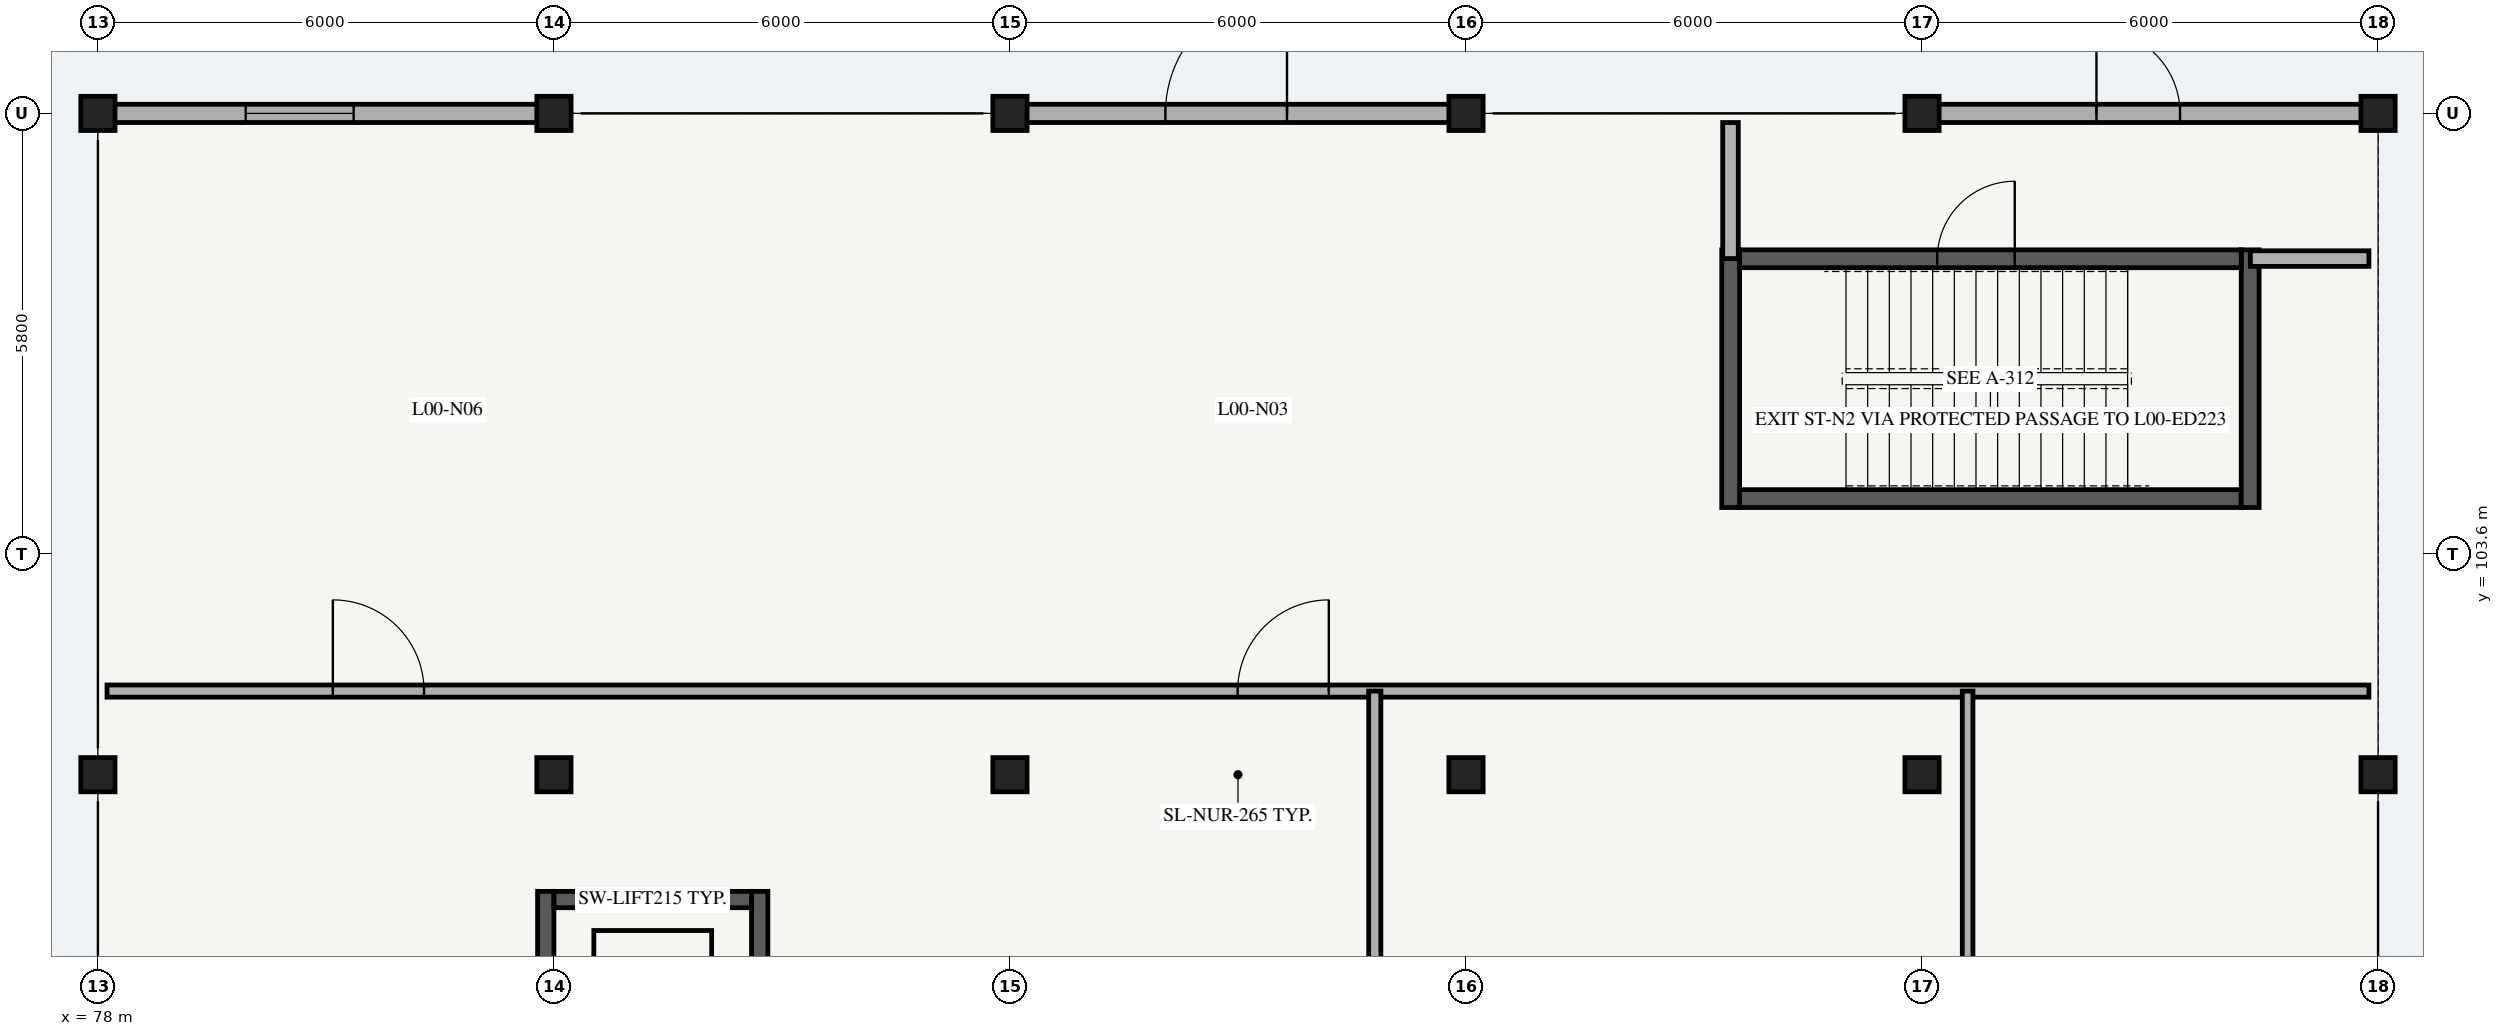
"""IFC4 building model, lengths in metres.
Left out: names, types, materials, properties, quantities, classifications, styles, units other than length and angle.
Written with IfcOpenShell. Run it as: python <this file> out.ifc"""

import sys

from ifc_helpers import new_model, si_unit, direction, frame, frame_2d, origin, origin_2d, place, context, subcontext, project, spatial, rectangle, extrude, element, fill, save


model = new_model("IFC4")
c1 = context("Model", 3, precision=1e-05, world=origin(), true_north=direction((0.0, 1.0)))
c2 = subcontext(c1, "Body", "Model", "MODEL_VIEW")
j1 = project(units=[si_unit("LENGTHUNIT", "METRE"), si_unit("PLANEANGLEUNIT", "RADIAN")], contexts=[c1])
p1 = place(None, origin())
s1 = spatial("IfcSite", under=j1, at=p1, CompositionType="ELEMENT")
p2 = place(p1, origin())
s2 = spatial("IfcBuilding", under=s1, at=p2, CompositionType="ELEMENT")
p3 = place(p2, origin())
s3 = spatial("IfcBuildingStorey", under=s2, at=p3, CompositionType="ELEMENT", Elevation=0.0)
p4 = place(p3, frame((83.893, 96.135, 0.0), z_axis=(0.0, 0.0, 1.0), x_axis=(0.0, 1.0, 0.0)))
e1 = element("IfcWall", 1, at=p4, inside=s3, PredefinedType="SHEAR", context=c2, shape_type="SweptSolid", body=[
    extrude(rectangle(XDim=3.03, YDim=0.215, at=frame_2d((1.515, 0.0))), origin(), (0.0, 0.0, 1.0), 4.495),
])
p5 = place(p4, frame((0.9, 0.0, 0.0)))
e2 = element("IfcOpeningElement", 2, at=p5, cuts=e1, PredefinedType="OPENING", context=c2, shape_type="SweptSolid", body=[
    extrude(rectangle(XDim=0.95, YDim=2.15, at=frame_2d((0.475, 1.075))), frame((0.0, 0.117, 0.0), z_axis=(0.0, -1.0, 0.0), x_axis=(1.0, 0.0, 0.0)), (0.0, 0.0, 1.0), 0.235),
])
p6 = place(p3, frame((86.708, 96.135, 0.0), z_axis=(0.0, 0.0, 1.0), x_axis=(0.0, 1.0, 0.0)))
e3 = element("IfcWall", 3, at=p6, inside=s3, PredefinedType="SHEAR", context=c2, shape_type="SweptSolid", body=[
    extrude(rectangle(XDim=3.03, YDim=0.215, at=frame_2d((1.515, 0.0))), origin(), (0.0, 0.0, 1.0), 4.495),
])
p7 = place(p3, frame((84.0, 99.058, 0.0), z_axis=(0.0, 0.0, 1.0), x_axis=(1.0, 0.0, 0.0)))
e4 = element("IfcWall", 4, at=p7, inside=s3, PredefinedType="SHEAR", context=c2, shape_type="SweptSolid", body=[
    extrude(rectangle(XDim=2.6, YDim=0.215, at=frame_2d((1.3, 0.0))), origin(), (0.0, 0.0, 1.0), 4.495),
])
p8 = place(p3, frame((99.6, 104.333, 0.0), z_axis=(0.0, 0.0, 1.0), x_axis=(1.0, 0.0, 0.0)))
e5 = element("IfcWall", 5, at=p8, inside=s3, PredefinedType="SHEAR", context=c2, shape_type="SweptSolid", body=[
    extrude(rectangle(XDim=6.6, YDim=0.235, at=frame_2d((3.3, 0.0))), origin(), (0.0, 0.0, 1.0), 4.495),
])
for number, where, z_axis, x_axis in (
    (6, (106.317, 104.215, 0.0), (0.0, 0.0, 1.0), (0.0, 1.0, 0.0)),
    (7, (99.482, 104.215, 0.0), (0.0, 0.0, 1.0), (0.0, 1.0, 0.0)),
):
    element("IfcWall", number, at=place(p3, frame(where, z_axis=z_axis, x_axis=x_axis)), inside=s3, PredefinedType="SHEAR", context=c2, shape_type="SweptSolid", body=[
        extrude(rectangle(XDim=3.39, YDim=0.235, at=frame_2d((1.695, 0.0))), origin(), (0.0, 0.0, 1.0), 4.495),
    ])
p9 = place(p3, frame((99.6, 107.488, 0.0), z_axis=(0.0, 0.0, 1.0), x_axis=(1.0, 0.0, 0.0)))
e8 = element("IfcWall", 8, at=p9, inside=s3, PredefinedType="SHEAR", context=c2, shape_type="SweptSolid", body=[
    extrude(rectangle(XDim=6.6, YDim=0.235, at=frame_2d((3.3, 0.0))), origin(), (0.0, 0.0, 1.0), 4.495),
])
p10 = place(p9, frame((2.6, 0.0, 0.0)))
e9 = element("IfcOpeningElement", 9, at=p10, cuts=e8, PredefinedType="OPENING", context=c2, shape_type="SweptSolid", body=[
    extrude(rectangle(XDim=1.02, YDim=2.14, at=frame_2d((0.51, 1.07))), frame((0.0, 0.127, 0.0), z_axis=(0.0, -1.0, 0.0), x_axis=(1.0, 0.0, 0.0)), (0.0, 0.0, 1.0), 0.255),
])
for number, where, z_axis, x_axis in (
    (10, (78.0, 100.7, 0.0), (0.0, 0.0, 1.0), (1.0, 0.0, 0.0)),
    (11, (78.0, 109.4, 0.0), (0.0, 0.0, 1.0), (1.0, 0.0, 0.0)),
    (12, (84.0, 100.7, 0.0), (0.0, 0.0, 1.0), (1.0, 0.0, 0.0)),
    (13, (84.0, 109.4, 0.0), (0.0, 0.0, 1.0), (1.0, 0.0, 0.0)),
    (14, (90.0, 100.7, 0.0), (0.0, 0.0, 1.0), (1.0, 0.0, 0.0)),
    (15, (90.0, 109.4, 0.0), (0.0, 0.0, 1.0), (1.0, 0.0, 0.0)),
    (16, (96.0, 100.7, 0.0), (0.0, 0.0, 1.0), (1.0, 0.0, 0.0)),
    (17, (96.0, 109.4, 0.0), (0.0, 0.0, 1.0), (1.0, 0.0, 0.0)),
    (18, (102.0, 100.7, 0.0), (0.0, 0.0, 1.0), (1.0, 0.0, 0.0)),
    (19, (102.0, 109.4, 0.0), (0.0, 0.0, 1.0), (1.0, 0.0, 0.0)),
    (20, (108.0, 100.7, 0.0), (0.0, 0.0, 1.0), (1.0, 0.0, 0.0)),
    (21, (108.0, 109.4, 0.0), (0.0, 0.0, 1.0), (1.0, 0.0, 0.0)),
):
    element("IfcColumn", number, at=place(p3, frame(where, z_axis=z_axis, x_axis=x_axis)), inside=s3, PredefinedType="COLUMN", context=c2, shape_type="SweptSolid", body=[
        extrude(rectangle(XDim=0.45, YDim=0.45, at=origin_2d()), origin(), (0.0, 0.0, 1.0), 4.495),
    ])
p11 = place(p3, frame((78.195, 109.4, 0.0), z_axis=(0.0, 0.0, 1.0), x_axis=(1.0, 0.0, 0.0)))
e22 = element("IfcWall", 22, at=p11, inside=s3, PredefinedType="SOLIDWALL", context=c2, shape_type="SweptSolid", body=[
    extrude(rectangle(XDim=5.61, YDim=0.24, at=frame_2d((2.805, 0.0))), origin(), (0.0, 0.0, 1.0), 3.75),
])
p12 = place(p11, frame((1.75, 0.0, 0.65)))
e23 = element("IfcOpeningElement", 23, at=p12, cuts=e22, PredefinedType="OPENING", context=c2, shape_type="SweptSolid", body=[
    extrude(rectangle(XDim=1.42, YDim=1.58, at=frame_2d((0.71, 0.79))), frame((0.0, 0.13, 0.0), z_axis=(0.0, -1.0, 0.0), x_axis=(1.0, 0.0, 0.0)), (0.0, 0.0, 1.0), 0.26),
])
p13 = place(p3, frame((90.195, 109.4, 0.0), z_axis=(0.0, 0.0, 1.0), x_axis=(1.0, 0.0, 0.0)))
e24 = element("IfcWall", 24, at=p13, inside=s3, PredefinedType="SOLIDWALL", context=c2, shape_type="SweptSolid", body=[
    extrude(rectangle(XDim=5.61, YDim=0.24, at=frame_2d((2.805, 0.0))), origin(), (0.0, 0.0, 1.0), 3.75),
])
p14 = place(p13, frame((1.85, 0.0, 0.0)))
e25 = element("IfcOpeningElement", 25, at=p14, cuts=e24, PredefinedType="OPENING", context=c2, shape_type="SweptSolid", body=[
    extrude(rectangle(XDim=1.6, YDim=2.25, at=frame_2d((0.8, 1.125))), frame((0.0, 0.13, 0.0), z_axis=(0.0, -1.0, 0.0), x_axis=(1.0, 0.0, 0.0)), (0.0, 0.0, 1.0), 0.26),
])
p15 = place(p3, frame((102.195, 109.4, 0.0), z_axis=(0.0, 0.0, 1.0), x_axis=(1.0, 0.0, 0.0)))
e26 = element("IfcWall", 26, at=p15, inside=s3, PredefinedType="SOLIDWALL", context=c2, shape_type="SweptSolid", body=[
    extrude(rectangle(XDim=5.61, YDim=0.24, at=frame_2d((2.805, 0.0))), origin(), (0.0, 0.0, 1.0), 3.75),
])
p16 = place(p15, frame((2.1, 0.0, 0.0)))
e27 = element("IfcOpeningElement", 27, at=p16, cuts=e26, PredefinedType="OPENING", context=c2, shape_type="SweptSolid", body=[
    extrude(rectangle(XDim=1.1, YDim=2.15, at=frame_2d((0.55, 1.075))), frame((0.0, 0.13, 0.0), z_axis=(0.0, -1.0, 0.0), x_axis=(1.0, 0.0, 0.0)), (0.0, 0.0, 1.0), 0.26),
])
p17 = place(p3, frame((99.48, 107.49, 0.0), z_axis=(0.0, 0.0, 1.0), x_axis=(0.0, 1.0, 0.0)))
e28 = element("IfcWall", 28, at=p17, inside=s3, PredefinedType="PARTITIONING", context=c2, shape_type="SweptSolid", body=[
    extrude(rectangle(XDim=1.79, YDim=0.205, at=frame_2d((0.895, 0.0))), origin(), (0.0, 0.0, 1.0), 3.52),
])
p18 = place(p3, frame((106.32, 107.49, 0.0), z_axis=(0.0, 0.0, 1.0), x_axis=(1.0, 0.0, 0.0)))
e29 = element("IfcWall", 29, at=p18, inside=s3, PredefinedType="PARTITIONING", context=c2, shape_type="SweptSolid", body=[
    extrude(rectangle(XDim=1.56, YDim=0.205, at=frame_2d((0.78, 0.0))), origin(), (0.0, 0.0, 1.0), 3.52),
])
p19 = place(p3, frame((78.12, 101.8, 0.0), z_axis=(0.0, 0.0, 1.0), x_axis=(1.0, 0.0, 0.0)))
e30 = element("IfcWall", 30, at=p19, inside=s3, PredefinedType="PARTITIONING", context=c2, shape_type="SweptSolid", body=[
    extrude(rectangle(XDim=29.76, YDim=0.16, at=frame_2d((14.88, 0.0))), origin(), (0.0, 0.0, 1.0), 3.52),
])
p20 = place(p19, frame((2.971, 0.0, 0.0)))
e31 = element("IfcOpeningElement", 31, at=p20, cuts=e30, PredefinedType="OPENING", context=c2, shape_type="SweptSolid", body=[
    extrude(rectangle(XDim=1.2, YDim=2.15, at=frame_2d((0.6, 1.075))), frame((0.0, 0.09, 0.0), z_axis=(0.0, -1.0, 0.0), x_axis=(1.0, 0.0, 0.0)), (0.0, 0.0, 1.0), 0.18),
])
p21 = place(p19, frame((14.875, 0.0, 0.0)))
e32 = element("IfcOpeningElement", 32, at=p21, cuts=e30, PredefinedType="OPENING", context=c2, shape_type="SweptSolid", body=[
    extrude(rectangle(XDim=1.2, YDim=2.15, at=frame_2d((0.6, 1.075))), frame((0.0, 0.09, 0.0), z_axis=(0.0, -1.0, 0.0), x_axis=(1.0, 0.0, 0.0)), (0.0, 0.0, 1.0), 0.18),
])
p22 = place(p3, frame((94.8, 92.12, 0.0), z_axis=(0.0, 0.0, 1.0), x_axis=(0.0, 1.0, 0.0)))
e33 = element("IfcWall", 33, at=p22, inside=s3, PredefinedType="PARTITIONING", context=c2, shape_type="SweptSolid", body=[
    extrude(rectangle(XDim=9.68, YDim=0.16, at=frame_2d((4.84, 0.0))), origin(), (0.0, 0.0, 1.0), 3.52),
])
p23 = place(p22, frame((4.046, 0.0, 0.0)))
e34 = element("IfcOpeningElement", 34, at=p23, cuts=e33, PredefinedType="OPENING", context=c2, shape_type="SweptSolid", body=[
    extrude(rectangle(XDim=1.2, YDim=2.15, at=frame_2d((0.6, 1.075))), frame((0.0, 0.09, 0.0), z_axis=(0.0, -1.0, 0.0), x_axis=(1.0, 0.0, 0.0)), (0.0, 0.0, 1.0), 0.18),
])
p24 = place(p3, frame((102.6, 92.12, 0.0), z_axis=(0.0, 0.0, 1.0), x_axis=(0.0, 1.0, 0.0)))
e35 = element("IfcWall", 35, at=p24, inside=s3, PredefinedType="PLUMBINGWALL", context=c2, shape_type="SweptSolid", body=[
    extrude(rectangle(XDim=9.68, YDim=0.14, at=frame_2d((4.84, 0.0))), origin(), (0.0, 0.0, 1.0), 3.52),
])
p25 = place(p24, frame((4.167, 0.0, 0.0)))
e36 = element("IfcOpeningElement", 36, at=p25, cuts=e35, PredefinedType="OPENING", context=c2, shape_type="SweptSolid", body=[
    extrude(rectangle(XDim=0.96, YDim=2.1, at=frame_2d((0.48, 1.05))), frame((0.0, 0.08, 0.0), z_axis=(0.0, -1.0, 0.0), x_axis=(1.0, 0.0, 0.0)), (0.0, 0.0, 1.0), 0.16),
])
p26 = place(p12, origin())
e37 = element("IfcWindow", 37, at=p26, inside=s3, PartitioningType="SINGLE_PANEL", PredefinedType="WINDOW", context=c2, shape_type="SweptSolid", body=[
    extrude(rectangle(XDim=1.42, YDim=1.58, at=frame_2d((0.71, 0.79))), frame((0.0, 0.03, 0.0), z_axis=(0.0, -1.0, 0.0), x_axis=(1.0, 0.0, 0.0)), (0.0, 0.0, 1.0), 0.06),
])
fill(e23, e37)
p27 = place(p14, origin())
e38 = element("IfcDoor", 38, at=p27, inside=s3, OperationType="DOUBLE_DOOR_SINGLE_SWING", PredefinedType="DOOR", context=c2, shape_type="SweptSolid", body=[
    extrude(rectangle(XDim=1.6, YDim=2.25, at=frame_2d((0.8, 1.125))), frame((0.0, 0.025, 0.0), z_axis=(0.0, -1.0, 0.0), x_axis=(1.0, 0.0, 0.0)), (0.0, 0.0, 1.0), 0.05),
])
fill(e25, e38)
p28 = place(p16, origin())
e39 = element("IfcDoor", 39, at=p28, inside=s3, OperationType="SINGLE_SWING_LEFT", PredefinedType="DOOR", context=c2, shape_type="SweptSolid", body=[
    extrude(rectangle(XDim=1.1, YDim=2.15, at=frame_2d((0.55, 1.075))), frame((0.0, 0.025, 0.0), z_axis=(0.0, -1.0, 0.0), x_axis=(1.0, 0.0, 0.0)), (0.0, 0.0, 1.0), 0.05),
])
fill(e27, e39)
p29 = place(p10, origin())
e40 = element("IfcDoor", 40, at=p29, inside=s3, OperationType="SINGLE_SWING_RIGHT", PredefinedType="DOOR", context=c2, shape_type="SweptSolid", body=[
    extrude(rectangle(XDim=1.02, YDim=2.14, at=frame_2d((0.51, 1.07))), frame((0.0, 0.025, 0.0), z_axis=(0.0, -1.0, 0.0), x_axis=(1.0, 0.0, 0.0)), (0.0, 0.0, 1.0), 0.05),
])
fill(e9, e40)
p30 = place(p20, origin())
e41 = element("IfcDoor", 41, at=p30, inside=s3, OperationType="SINGLE_SWING_LEFT", PredefinedType="DOOR", context=c2, shape_type="SweptSolid", body=[
    extrude(rectangle(XDim=1.2, YDim=2.15, at=frame_2d((0.6, 1.075))), frame((0.0, 0.025, 0.0), z_axis=(0.0, -1.0, 0.0), x_axis=(1.0, 0.0, 0.0)), (0.0, 0.0, 1.0), 0.05),
])
fill(e31, e41)
p31 = place(p21, origin())
e42 = element("IfcDoor", 42, at=p31, inside=s3, OperationType="SINGLE_SWING_RIGHT", PredefinedType="DOOR", context=c2, shape_type="SweptSolid", body=[
    extrude(rectangle(XDim=1.2, YDim=2.15, at=frame_2d((0.6, 1.075))), frame((0.0, 0.025, 0.0), z_axis=(0.0, -1.0, 0.0), x_axis=(1.0, 0.0, 0.0)), (0.0, 0.0, 1.0), 0.05),
])
fill(e32, e42)
save(model, sys.argv[1])
